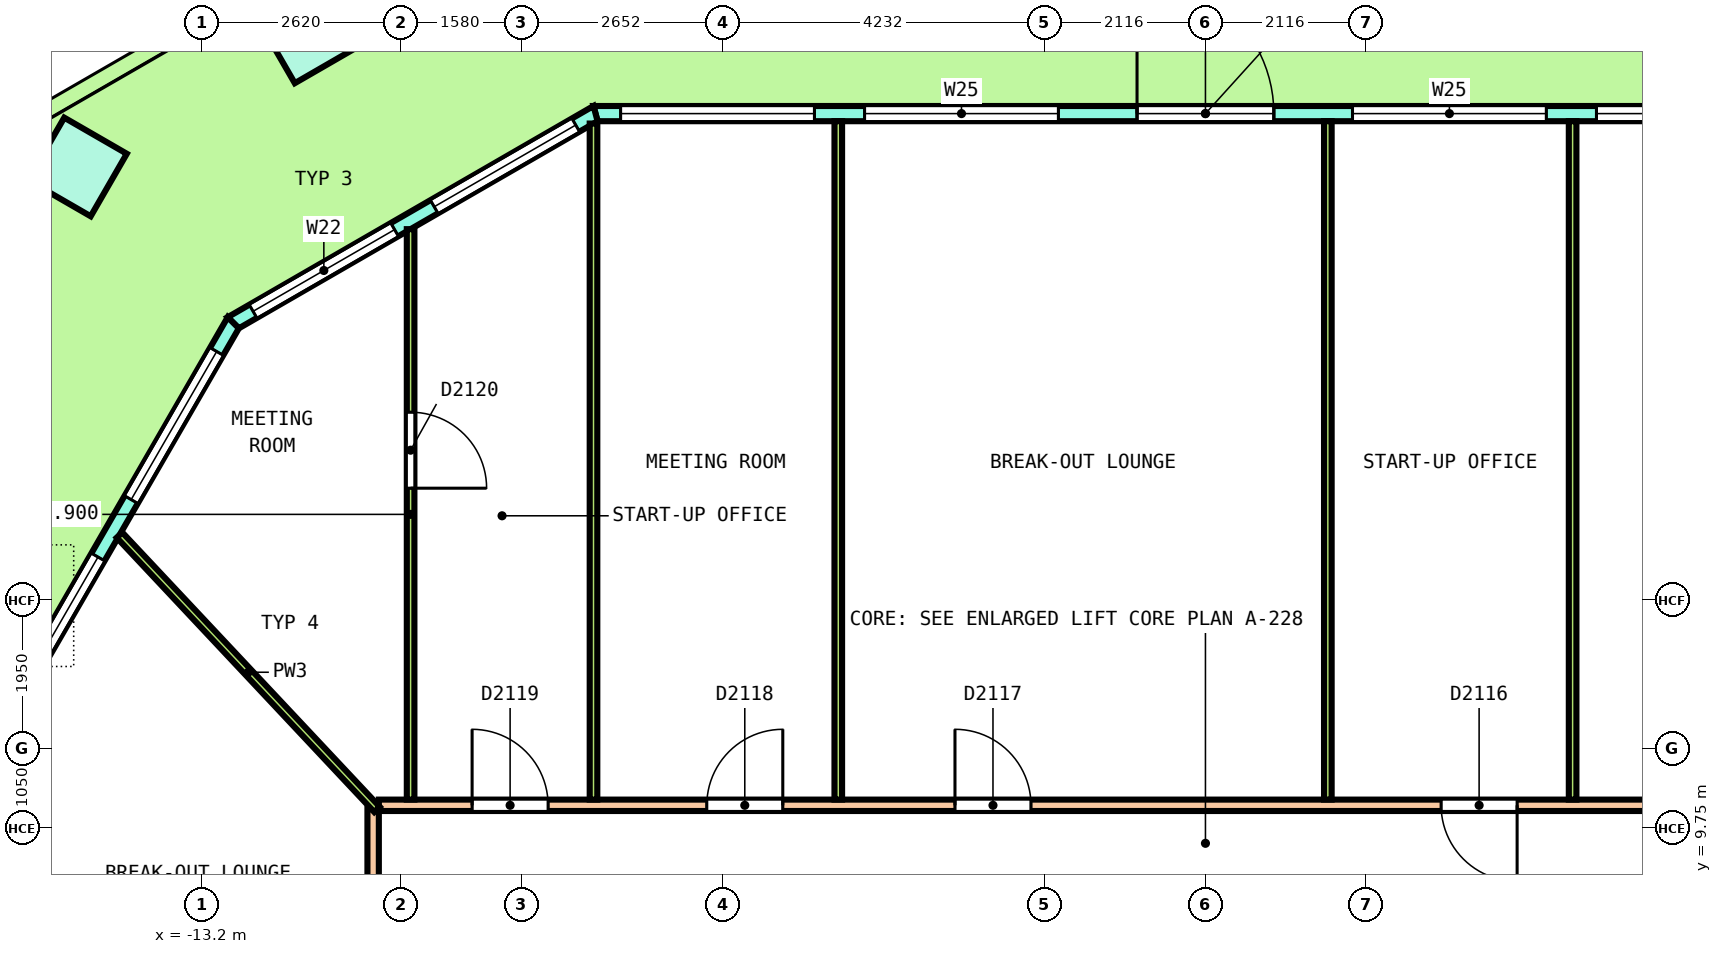
"""IFC4 building model, lengths in metres.
Left out: names, types, materials, properties, quantities, classifications, styles, units other than length and angle.
Written with IfcOpenShell. Run it as: python <this file> out.ifc"""

import sys

from ifc_helpers import new_model, si_unit, direction, frame, frame_2d, origin, origin_2d, place, context, subcontext, project, spatial, polyline, rectangle, outline, extrude, element, fill, save


model = new_model("IFC4")
c1 = context("Model", 3, precision=1e-05, world=origin(), true_north=direction((0.0, 1.0)))
c2 = subcontext(c1, "Body", "Model", "MODEL_VIEW")
j1 = project(units=[si_unit("LENGTHUNIT", "METRE"), si_unit("PLANEANGLEUNIT", "RADIAN")], contexts=[c1])
p1 = place(None, origin())
s1 = spatial("IfcSite", under=j1, at=p1, CompositionType="ELEMENT")
p2 = place(p1, origin())
s2 = spatial("IfcBuilding", under=s1, at=p2, CompositionType="ELEMENT")
p3 = place(p2, frame((0.0, 0.0, 267.0)))
s3 = spatial("IfcBuildingStorey", under=s2, at=p3, CompositionType="ELEMENT", Elevation=267.0)
for number, where, z_axis, x_axis in (
    (1, (-11.807, 20.199, 0.0), (-0.036, 0.0, 0.999), (-0.865, -0.5, -0.031)),
    (2, (-14.84, 18.448, 0.0), (-0.036, 0.0, 0.999), (-0.499, -0.866, -0.018)),
):
    element("IfcColumn", number, at=place(p3, frame(where, z_axis=z_axis, x_axis=x_axis)), inside=s3, PredefinedType="COLUMN", context=c2, shape_type="SweptSolid", body=[
        extrude(rectangle(XDim=0.95, YDim=0.95, at=origin_2d()), origin(), (0.0, 0.0, 1.0), 3.652),
    ])
p4 = place(p3, frame((8.024, 19.15, 0.0), z_axis=(0.0, 0.0, 1.0), x_axis=(-1.0, 0.0, 0.0)))
e3 = element("IfcWall", 3, at=p4, inside=s3, PredefinedType="SOLIDWALL", context=c2, shape_type="SweptSolid", body=[
    extrude(outline(polyline([(-0.027, -0.1), (0.979, -0.1), (1.986, -0.1), (2.992, -0.1), (3.999, -0.1), (5.005, -0.1), (6.011, -0.1), (7.018, -0.1), (8.024, -0.1), (9.03, -0.1), (10.037, -0.1), (11.043, -0.1), (12.049, -0.1), (13.056, -0.1), (14.062, -0.1), (15.068, -0.1), (16.075, -0.1), (16.021, 0.1), (15.021, 0.1), (14.022, 0.1), (13.022, 0.1), (12.022, 0.1), (11.023, 0.1), (10.023, 0.1), (9.023, 0.1), (8.024, 0.1), (7.024, 0.1), (6.025, 0.1), (5.025, 0.1), (4.025, 0.1), (3.026, 0.1), (2.026, 0.1), (1.026, 0.1), (0.027, 0.1), (-0.027, -0.1)])), origin(), (0.0, 0.0, 1.0), 3.7),
])
p5 = place(p4, frame((0.33, 0.0, 0.1)))
e4 = element("IfcOpeningElement", 4, at=p5, cuts=e3, PredefinedType="OPENING", context=c2, shape_type="SweptSolid", body=[
    extrude(rectangle(XDim=2.55, YDim=2.75, at=frame_2d((1.275, 1.375))), frame((0.0, 0.11, 0.0), z_axis=(0.0, -1.0, 0.0), x_axis=(1.0, 0.0, 0.0)), (0.0, 0.0, 1.0), 0.22),
])
p6 = place(p4, frame((3.539, 0.0, 0.1)))
e5 = element("IfcOpeningElement", 5, at=p6, cuts=e3, PredefinedType="OPENING", context=c2, shape_type="SweptSolid", body=[
    extrude(rectangle(XDim=2.55, YDim=2.75, at=frame_2d((1.275, 1.375))), frame((0.0, 0.11, 0.0), z_axis=(0.0, -1.0, 0.0), x_axis=(1.0, 0.0, 0.0)), (0.0, 0.0, 1.0), 0.22),
])
p7 = place(p4, frame((7.124, 0.0, 0.0)))
e6 = element("IfcOpeningElement", 6, at=p7, cuts=e3, PredefinedType="OPENING", context=c2, shape_type="SweptSolid", body=[
    extrude(rectangle(XDim=1.8, YDim=2.4, at=frame_2d((0.9, 1.2))), frame((0.0, 0.11, 0.0), z_axis=(0.0, -1.0, 0.0), x_axis=(1.0, 0.0, 0.0)), (0.0, 0.0, 1.0), 0.22),
])
p8 = place(p4, frame((7.124, 0.0, 2.55)))
e7 = element("IfcOpeningElement", 7, at=p8, cuts=e3, PredefinedType="OPENING", context=c2, shape_type="SweptSolid", body=[
    extrude(rectangle(XDim=1.8, YDim=0.3, at=frame_2d((0.9, 0.15))), frame((0.0, 0.11, 0.0), z_axis=(0.0, -1.0, 0.0), x_axis=(1.0, 0.0, 0.0)), (0.0, 0.0, 1.0), 0.22),
])
p9 = place(p4, frame((9.958, 0.0, 0.1)))
e8 = element("IfcOpeningElement", 8, at=p9, cuts=e3, PredefinedType="OPENING", context=c2, shape_type="SweptSolid", body=[
    extrude(rectangle(XDim=2.55, YDim=2.75, at=frame_2d((1.275, 1.375))), frame((0.0, 0.11, 0.0), z_axis=(0.0, -1.0, 0.0), x_axis=(1.0, 0.0, 0.0)), (0.0, 0.0, 1.0), 0.22),
])
p10 = place(p4, frame((13.168, 0.0, 0.1)))
e9 = element("IfcOpeningElement", 9, at=p10, cuts=e3, PredefinedType="OPENING", context=c2, shape_type="SweptSolid", body=[
    extrude(rectangle(XDim=2.55, YDim=2.75, at=frame_2d((1.275, 1.375))), frame((0.0, 0.11, 0.0), z_axis=(0.0, -1.0, 0.0), x_axis=(1.0, 0.0, 0.0)), (0.0, 0.0, 1.0), 0.22),
])
p11 = place(p3, frame((-8.024, 19.15, 0.0), z_axis=(0.0, 0.0, 1.0), x_axis=(-0.866026017613, -0.499998936816, 0.0)))
e10 = element("IfcWall", 10, at=p11, inside=s3, PredefinedType="SOLIDWALL", context=c2, shape_type="SweptSolid", body=[
    extrude(outline(polyline([(-0.027, -0.1), (1.084, -0.1), (2.196, -0.1), (3.307, -0.1), (4.419, -0.1), (5.53, -0.1), (5.477, 0.1), (4.387, 0.1), (3.297, 0.1), (2.207, 0.1), (1.117, 0.1), (0.027, 0.1), (-0.027, -0.1)])), origin(), (0.0, 0.0, 1.0), 3.7),
])
p12 = place(p11, frame((0.301, 0.0, 0.1)))
e11 = element("IfcOpeningElement", 11, at=p12, cuts=e10, PredefinedType="OPENING", context=c2, shape_type="SweptSolid", body=[
    extrude(rectangle(XDim=2.15, YDim=2.75, at=frame_2d((1.075, 1.375))), frame((0.0, 0.11, 0.0), z_axis=(0.0, -1.0, 0.0), x_axis=(1.0, 0.0, 0.0)), (0.0, 0.0, 1.0), 0.22),
])
p13 = place(p11, frame((3.052, 0.0, 0.1)))
e12 = element("IfcOpeningElement", 12, at=p13, cuts=e10, PredefinedType="OPENING", context=c2, shape_type="SweptSolid", body=[
    extrude(rectangle(XDim=2.15, YDim=2.75, at=frame_2d((1.075, 1.375))), frame((0.0, 0.11, 0.0), z_axis=(0.0, -1.0, 0.0), x_axis=(1.0, 0.0, 0.0)), (0.0, 0.0, 1.0), 0.22),
])
p14 = place(p3, frame((-12.79, 16.398, 0.0), z_axis=(0.0, 0.0, 1.0), x_axis=(-0.500008968961, -0.86602022549, 0.0)))
e13 = element("IfcWall", 13, at=p14, inside=s3, PredefinedType="SOLIDWALL", context=c2, shape_type="SweptSolid", body=[
    extrude(outline(polyline([(-0.027, -0.1), (1.018, -0.1), (2.062, -0.1), (3.106, -0.1), (4.151, -0.1), (5.195, -0.1), (6.24, -0.1), (7.284, -0.1), (8.328, -0.1), (9.373, -0.1), (10.417, -0.1), (11.462, -0.1), (12.506, -0.1), (13.551, -0.1), (14.595, -0.1), (15.639, -0.1), (15.586, 0.1), (14.548, 0.1), (13.511, 0.1), (12.474, 0.1), (11.437, 0.1), (10.399, 0.1), (9.362, 0.1), (8.325, 0.1), (7.288, 0.1), (6.25, 0.1), (5.213, 0.1), (4.176, 0.1), (3.139, 0.1), (2.101, 0.1), (1.064, 0.1), (0.027, 0.1), (-0.027, -0.1)])), origin(), (0.0, 0.0, 1.0), 3.7),
])
p15 = place(p14, frame((0.436, 0.0, 0.1)))
e14 = element("IfcOpeningElement", 14, at=p15, cuts=e13, PredefinedType="OPENING", context=c2, shape_type="SweptSolid", body=[
    extrude(rectangle(XDim=2.25, YDim=2.75, at=frame_2d((1.125, 1.375))), frame((0.0, 0.11, 0.0), z_axis=(0.0, -1.0, 0.0), x_axis=(1.0, 0.0, 0.0)), (0.0, 0.0, 1.0), 0.22),
])
p16 = place(p14, frame((3.559, 0.0, 0.1)))
e15 = element("IfcOpeningElement", 15, at=p16, cuts=e13, PredefinedType="OPENING", context=c2, shape_type="SweptSolid", body=[
    extrude(rectangle(XDim=2.25, YDim=2.75, at=frame_2d((1.125, 1.375))), frame((0.0, 0.11, 0.0), z_axis=(0.0, -1.0, 0.0), x_axis=(1.0, 0.0, 0.0)), (0.0, 0.0, 1.0), 0.22),
])
p17 = place(p14, frame((6.906, 0.0, 0.0)))
e16 = element("IfcOpeningElement", 16, at=p17, cuts=e13, PredefinedType="OPENING", context=c2, shape_type="SweptSolid", body=[
    extrude(rectangle(XDim=1.8, YDim=2.4, at=frame_2d((0.9, 1.2))), frame((0.0, 0.11, 0.0), z_axis=(0.0, -1.0, 0.0), x_axis=(1.0, 0.0, 0.0)), (0.0, 0.0, 1.0), 0.22),
])
p18 = place(p14, frame((6.906, 0.0, 2.55)))
e17 = element("IfcOpeningElement", 17, at=p18, cuts=e13, PredefinedType="OPENING", context=c2, shape_type="SweptSolid", body=[
    extrude(rectangle(XDim=1.8, YDim=0.3, at=frame_2d((0.9, 0.15))), frame((0.0, 0.11, 0.0), z_axis=(0.0, -1.0, 0.0), x_axis=(1.0, 0.0, 0.0)), (0.0, 0.0, 1.0), 0.22),
])
p19 = place(p14, frame((9.804, 0.0, 0.1)))
e18 = element("IfcOpeningElement", 18, at=p19, cuts=e13, PredefinedType="OPENING", context=c2, shape_type="SweptSolid", body=[
    extrude(rectangle(XDim=2.25, YDim=2.75, at=frame_2d((1.125, 1.375))), frame((0.0, 0.11, 0.0), z_axis=(0.0, -1.0, 0.0), x_axis=(1.0, 0.0, 0.0)), (0.0, 0.0, 1.0), 0.22),
])
p20 = place(p14, frame((12.926, 0.0, 0.1)))
e19 = element("IfcOpeningElement", 19, at=p20, cuts=e13, PredefinedType="OPENING", context=c2, shape_type="SweptSolid", body=[
    extrude(rectangle(XDim=2.25, YDim=2.75, at=frame_2d((1.125, 1.375))), frame((0.0, 0.11, 0.0), z_axis=(0.0, -1.0, 0.0), x_axis=(1.0, 0.0, 0.0)), (0.0, 0.0, 1.0), 0.22),
])
p21 = place(p3, frame((-10.875, 10.05, 0.0), z_axis=(0.0, 0.0, 1.0), x_axis=(1.0, 0.0, 0.0)))
e20 = element("IfcWall", 20, at=p21, inside=s3, PredefinedType="PARTITIONING", context=c2, shape_type="SweptSolid", body=[
    extrude(rectangle(XDim=21.775, YDim=0.15, at=frame_2d((10.887, 0.0))), origin(), (0.0, 0.0, 1.0), 2.9),
])
p22 = place(p21, frame((16.987, 0.0, 0.0)))
e21 = element("IfcOpeningElement", 21, at=p22, cuts=e20, PredefinedType="OPENING", context=c2, shape_type="SweptSolid", body=[
    extrude(rectangle(XDim=1.2, YDim=2.1, at=frame_2d((0.6, 1.05))), frame((0.0, 0.085, 0.0), z_axis=(0.0, -1.0, 0.0), x_axis=(1.0, 0.0, 0.0)), (0.0, 0.0, 1.0), 0.17),
])
p23 = place(p21, frame((13.975, 0.0, 0.0)))
e22 = element("IfcOpeningElement", 22, at=p23, cuts=e20, PredefinedType="OPENING", context=c2, shape_type="SweptSolid", body=[
    extrude(rectangle(XDim=1.0, YDim=2.1, at=frame_2d((0.5, 1.05))), frame((0.0, 0.085, 0.0), z_axis=(0.0, -1.0, 0.0), x_axis=(1.0, 0.0, 0.0)), (0.0, 0.0, 1.0), 0.17),
])
p24 = place(p21, frame((7.58, 0.0, 0.0)))
e23 = element("IfcOpeningElement", 23, at=p24, cuts=e20, PredefinedType="OPENING", context=c2, shape_type="SweptSolid", body=[
    extrude(rectangle(XDim=1.0, YDim=2.1, at=frame_2d((0.5, 1.05))), frame((0.0, 0.085, 0.0), z_axis=(0.0, -1.0, 0.0), x_axis=(1.0, 0.0, 0.0)), (0.0, 0.0, 1.0), 0.17),
])
p25 = place(p21, frame((4.314, 0.0, 0.0)))
e24 = element("IfcOpeningElement", 24, at=p25, cuts=e20, PredefinedType="OPENING", context=c2, shape_type="SweptSolid", body=[
    extrude(rectangle(XDim=1.0, YDim=2.1, at=frame_2d((0.5, 1.05))), frame((0.0, 0.085, 0.0), z_axis=(0.0, -1.0, 0.0), x_axis=(1.0, 0.0, 0.0)), (0.0, 0.0, 1.0), 0.17),
])
p26 = place(p21, frame((1.227, 0.0, 0.0)))
e25 = element("IfcOpeningElement", 25, at=p26, cuts=e20, PredefinedType="OPENING", context=c2, shape_type="SweptSolid", body=[
    extrude(rectangle(XDim=1.0, YDim=2.1, at=frame_2d((0.5, 1.05))), frame((0.0, 0.085, 0.0), z_axis=(0.0, -1.0, 0.0), x_axis=(1.0, 0.0, 0.0)), (0.0, 0.0, 1.0), 0.17),
])
p27 = place(p3, frame((-10.95, -7.025, 0.0), z_axis=(0.0, 0.0, 1.0), x_axis=(0.0, 1.0, 0.0)))
e26 = element("IfcWall", 26, at=p27, inside=s3, PredefinedType="PARTITIONING", context=c2, shape_type="SweptSolid", body=[
    extrude(rectangle(XDim=17.025, YDim=0.15, at=frame_2d((8.512, 0.0))), origin(), (0.0, 0.0, 1.0), 2.9),
])
p28 = place(p27, frame((13.347, 0.0, 0.0)))
e27 = element("IfcOpeningElement", 27, at=p28, cuts=e26, PredefinedType="OPENING", context=c2, shape_type="SweptSolid", body=[
    extrude(rectangle(XDim=1.0, YDim=2.1, at=frame_2d((0.5, 1.05))), frame((0.0, 0.085, 0.0), z_axis=(0.0, -1.0, 0.0), x_axis=(1.0, 0.0, 0.0)), (0.0, 0.0, 1.0), 0.17),
])
p29 = place(p27, frame((8.863, 0.0, 0.0)))
e28 = element("IfcOpeningElement", 28, at=p29, cuts=e26, PredefinedType="OPENING", context=c2, shape_type="SweptSolid", body=[
    extrude(rectangle(XDim=1.2, YDim=2.1, at=frame_2d((0.6, 1.05))), frame((0.0, 0.085, 0.0), z_axis=(0.0, -1.0, 0.0), x_axis=(1.0, 0.0, 0.0)), (0.0, 0.0, 1.0), 0.17),
])
for number, where, z_axis, x_axis in (
    (29, (4.831, 10.125, 0.0), (0.0, 0.0, 1.0), (0.0, 1.0, 0.0)),
    (30, (1.61, 10.125, 0.0), (0.0, 0.0, 1.0), (0.0, 1.0, 0.0)),
    (31, (-4.831, 10.125, 0.0), (0.0, 0.0, 1.0), (0.0, 1.0, 0.0)),
):
    element("IfcWall", number, at=place(p3, frame(where, z_axis=z_axis, x_axis=x_axis)), inside=s3, PredefinedType="PARTITIONING", context=c2, shape_type="SweptSolid", body=[
        extrude(rectangle(XDim=8.925, YDim=0.1, at=frame_2d((4.462, 0.0))), origin(), (0.0, 0.0, 1.0), 2.9),
    ])
p30 = place(p3, frame((-8.051, 10.125, 0.0), z_axis=(0.0, 0.0, 1.0), x_axis=(0.0, 1.0, 0.0)))
e32 = element("IfcWall", 32, at=p30, inside=s3, PredefinedType="PARTITIONING", context=c2, shape_type="SweptSolid", body=[
    extrude(rectangle(XDim=8.894, YDim=0.1, at=frame_2d((4.447, 0.0))), origin(), (0.0, 0.0, 1.0), 2.9),
])
p31 = place(p3, frame((-10.457, 10.125, 0.0), z_axis=(0.0, 0.0, 1.0), x_axis=(0.0, 1.0, 0.0)))
e33 = element("IfcWall", 33, at=p31, inside=s3, PredefinedType="PARTITIONING", context=c2, shape_type="SweptSolid", body=[
    extrude(rectangle(XDim=7.505, YDim=0.1, at=frame_2d((3.752, 0.0))), origin(), (0.0, 0.0, 1.0), 2.9),
])
p32 = place(p31, frame((4.097, 0.0, 0.0)))
e34 = element("IfcOpeningElement", 34, at=p32, cuts=e33, PredefinedType="OPENING", context=c2, shape_type="SweptSolid", body=[
    extrude(rectangle(XDim=1.0, YDim=2.1, at=frame_2d((0.5, 1.05))), frame((0.0, 0.06, 0.0), z_axis=(0.0, -1.0, 0.0), x_axis=(1.0, 0.0, 0.0)), (0.0, 0.0, 1.0), 0.12),
])
p33 = place(p3, frame((-14.287, 13.606, 0.0), z_axis=(0.0, 0.0, 1.0), x_axis=(0.684315010891, -0.729186509659, 0.0)))
e35 = element("IfcWall", 35, at=p33, inside=s3, PredefinedType="PARTITIONING", context=c2, shape_type="SweptSolid", body=[
    extrude(rectangle(XDim=4.951, YDim=0.1, at=frame_2d((2.476, 0.0))), origin(), (0.0, 0.0, 1.0), 2.9),
])
p34 = place(p5, origin())
e36 = element("IfcWindow", 36, at=p34, inside=s3, PartitioningType="SINGLE_PANEL", PredefinedType="WINDOW", context=c2, shape_type="SweptSolid", body=[
    extrude(rectangle(XDim=2.55, YDim=2.75, at=frame_2d((1.275, 1.375))), frame((0.0, 0.03, 0.0), z_axis=(0.0, -1.0, 0.0), x_axis=(1.0, 0.0, 0.0)), (0.0, 0.0, 1.0), 0.06),
])
fill(e4, e36)
p35 = place(p6, origin())
e37 = element("IfcWindow", 37, at=p35, inside=s3, PartitioningType="SINGLE_PANEL", PredefinedType="WINDOW", context=c2, shape_type="SweptSolid", body=[
    extrude(rectangle(XDim=2.55, YDim=2.75, at=frame_2d((1.275, 1.375))), frame((0.0, 0.03, 0.0), z_axis=(0.0, -1.0, 0.0), x_axis=(1.0, 0.0, 0.0)), (0.0, 0.0, 1.0), 0.06),
])
fill(e5, e37)
p36 = place(p7, origin())
e38 = element("IfcDoor", 38, at=p36, inside=s3, OperationType="DOUBLE_DOOR_SINGLE_SWING", PredefinedType="DOOR", context=c2, shape_type="SweptSolid", body=[
    extrude(rectangle(XDim=1.8, YDim=2.4, at=frame_2d((0.9, 1.2))), frame((0.0, 0.025, 0.0), z_axis=(0.0, -1.0, 0.0), x_axis=(1.0, 0.0, 0.0)), (0.0, 0.0, 1.0), 0.05),
])
fill(e6, e38)
p37 = place(p8, origin())
e39 = element("IfcWindow", 39, at=p37, inside=s3, PartitioningType="SINGLE_PANEL", PredefinedType="WINDOW", context=c2, shape_type="SweptSolid", body=[
    extrude(rectangle(XDim=1.8, YDim=0.3, at=frame_2d((0.9, 0.15))), frame((0.0, 0.03, 0.0), z_axis=(0.0, -1.0, 0.0), x_axis=(1.0, 0.0, 0.0)), (0.0, 0.0, 1.0), 0.06),
])
fill(e7, e39)
p38 = place(p9, origin())
e40 = element("IfcWindow", 40, at=p38, inside=s3, PartitioningType="SINGLE_PANEL", PredefinedType="WINDOW", context=c2, shape_type="SweptSolid", body=[
    extrude(rectangle(XDim=2.55, YDim=2.75, at=frame_2d((1.275, 1.375))), frame((0.0, 0.03, 0.0), z_axis=(0.0, -1.0, 0.0), x_axis=(1.0, 0.0, 0.0)), (0.0, 0.0, 1.0), 0.06),
])
fill(e8, e40)
p39 = place(p10, origin())
e41 = element("IfcWindow", 41, at=p39, inside=s3, PartitioningType="SINGLE_PANEL", PredefinedType="WINDOW", context=c2, shape_type="SweptSolid", body=[
    extrude(rectangle(XDim=2.55, YDim=2.75, at=frame_2d((1.275, 1.375))), frame((0.0, 0.03, 0.0), z_axis=(0.0, -1.0, 0.0), x_axis=(1.0, 0.0, 0.0)), (0.0, 0.0, 1.0), 0.06),
])
fill(e9, e41)
p40 = place(p12, origin())
e42 = element("IfcWindow", 42, at=p40, inside=s3, PartitioningType="SINGLE_PANEL", PredefinedType="WINDOW", context=c2, shape_type="SweptSolid", body=[
    extrude(rectangle(XDim=2.15, YDim=2.75, at=frame_2d((1.075, 1.375))), frame((0.0, 0.03, 0.0), z_axis=(0.0, -1.0, 0.0), x_axis=(1.0, 0.0, 0.0)), (0.0, 0.0, 1.0), 0.06),
])
fill(e11, e42)
p41 = place(p13, origin())
e43 = element("IfcWindow", 43, at=p41, inside=s3, PartitioningType="SINGLE_PANEL", PredefinedType="WINDOW", context=c2, shape_type="SweptSolid", body=[
    extrude(rectangle(XDim=2.15, YDim=2.75, at=frame_2d((1.075, 1.375))), frame((0.0, 0.03, 0.0), z_axis=(0.0, -1.0, 0.0), x_axis=(1.0, 0.0, 0.0)), (0.0, 0.0, 1.0), 0.06),
])
fill(e12, e43)
p42 = place(p15, origin())
e44 = element("IfcWindow", 44, at=p42, inside=s3, PartitioningType="SINGLE_PANEL", PredefinedType="WINDOW", context=c2, shape_type="SweptSolid", body=[
    extrude(rectangle(XDim=2.25, YDim=2.75, at=frame_2d((1.125, 1.375))), frame((0.0, 0.03, 0.0), z_axis=(0.0, -1.0, 0.0), x_axis=(1.0, 0.0, 0.0)), (0.0, 0.0, 1.0), 0.06),
])
fill(e14, e44)
p43 = place(p16, origin())
e45 = element("IfcWindow", 45, at=p43, inside=s3, PartitioningType="SINGLE_PANEL", PredefinedType="WINDOW", context=c2, shape_type="SweptSolid", body=[
    extrude(rectangle(XDim=2.25, YDim=2.75, at=frame_2d((1.125, 1.375))), frame((0.0, 0.03, 0.0), z_axis=(0.0, -1.0, 0.0), x_axis=(1.0, 0.0, 0.0)), (0.0, 0.0, 1.0), 0.06),
])
fill(e15, e45)
p44 = place(p23, origin())
e46 = element("IfcDoor", 46, at=p44, inside=s3, OperationType="SINGLE_SWING_LEFT", PredefinedType="DOOR", context=c2, shape_type="SweptSolid", body=[
    extrude(rectangle(XDim=1.0, YDim=2.1, at=frame_2d((0.5, 1.05))), frame((0.0, 0.025, 0.0), z_axis=(0.0, -1.0, 0.0), x_axis=(1.0, 0.0, 0.0)), (0.0, 0.0, 1.0), 0.05),
])
fill(e22, e46)
p45 = place(p24, origin())
e47 = element("IfcDoor", 47, at=p45, inside=s3, OperationType="SINGLE_SWING_RIGHT", PredefinedType="DOOR", context=c2, shape_type="SweptSolid", body=[
    extrude(rectangle(XDim=1.0, YDim=2.1, at=frame_2d((0.5, 1.05))), frame((0.0, 0.025, 0.0), z_axis=(0.0, -1.0, 0.0), x_axis=(1.0, 0.0, 0.0)), (0.0, 0.0, 1.0), 0.05),
])
fill(e23, e47)
p46 = place(p25, origin())
e48 = element("IfcDoor", 48, at=p46, inside=s3, OperationType="SINGLE_SWING_RIGHT", PredefinedType="DOOR", context=c2, shape_type="SweptSolid", body=[
    extrude(rectangle(XDim=1.0, YDim=2.1, at=frame_2d((0.5, 1.05))), frame((0.0, 0.025, 0.0), z_axis=(0.0, -1.0, 0.0), x_axis=(1.0, 0.0, 0.0)), (0.0, 0.0, 1.0), 0.05),
])
fill(e24, e48)
p47 = place(p26, origin())
e49 = element("IfcDoor", 49, at=p47, inside=s3, OperationType="SINGLE_SWING_RIGHT", PredefinedType="DOOR", context=c2, shape_type="SweptSolid", body=[
    extrude(rectangle(XDim=1.0, YDim=2.1, at=frame_2d((0.5, 1.05))), frame((0.0, 0.025, 0.0), z_axis=(0.0, -1.0, 0.0), x_axis=(1.0, 0.0, 0.0)), (0.0, 0.0, 1.0), 0.05),
])
fill(e25, e49)
p48 = place(p32, origin())
e50 = element("IfcDoor", 50, at=p48, inside=s3, OperationType="SINGLE_SWING_LEFT", PredefinedType="DOOR", context=c2, shape_type="SweptSolid", body=[
    extrude(rectangle(XDim=1.0, YDim=2.1, at=frame_2d((0.5, 1.05))), frame((0.0, 0.025, 0.0), z_axis=(0.0, -1.0, 0.0), x_axis=(1.0, 0.0, 0.0)), (0.0, 0.0, 1.0), 0.05),
])
fill(e34, e50)
save(model, sys.argv[1])
